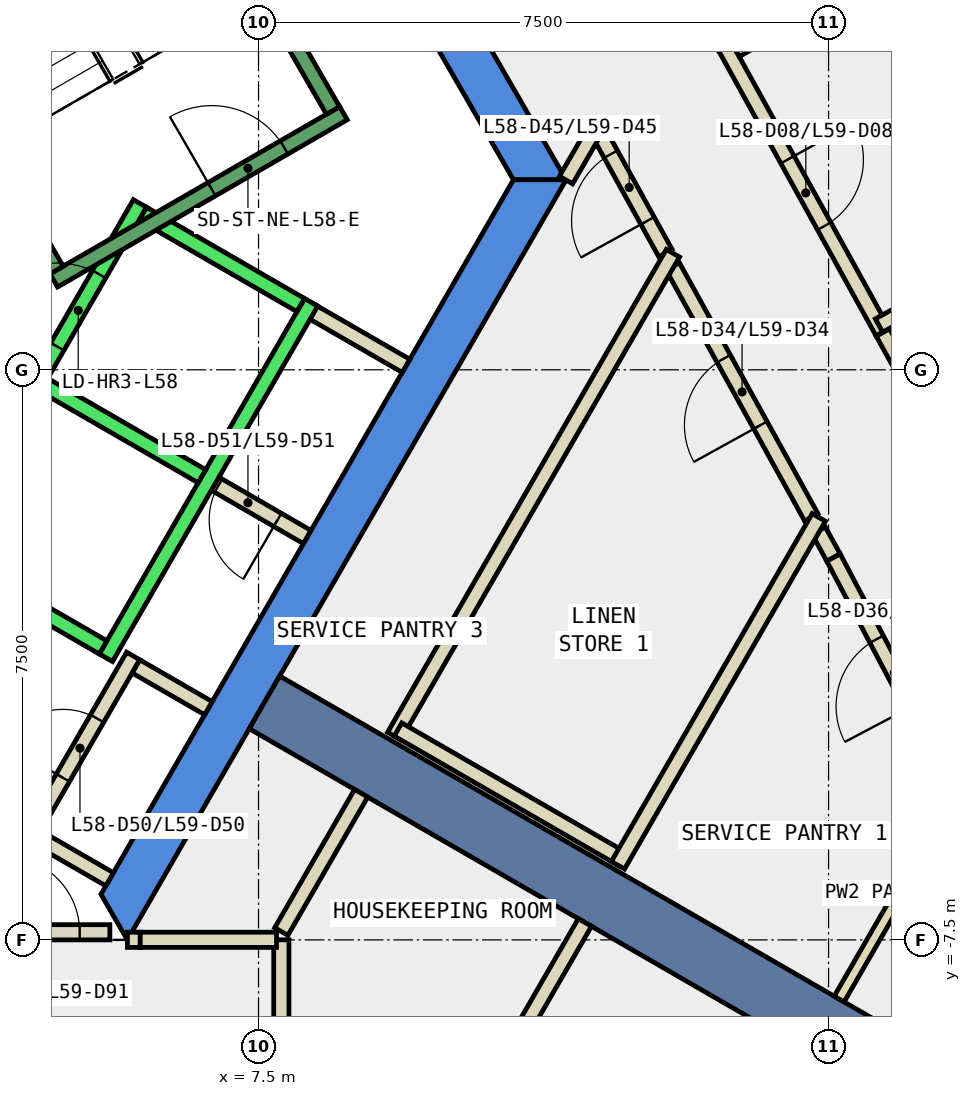
"""IFC4 building model, lengths in metres.
Left out: names, types, materials, properties, quantities, classifications, styles, units other than length and angle.
Written with IfcOpenShell. Run it as: python <this file> out.ifc"""

import sys

from ifc_helpers import new_model, si_unit, direction, frame, frame_2d, origin, place, context, subcontext, project, spatial, polyline, rectangle, outline, extrude, element, fill, save


model = new_model("IFC4")
c1 = context("Model", 3, precision=1e-05, world=origin(), true_north=direction((0.0, 1.0)))
c2 = subcontext(c1, "Body", "Model", "MODEL_VIEW")
j1 = project(units=[si_unit("LENGTHUNIT", "METRE"), si_unit("PLANEANGLEUNIT", "RADIAN")], contexts=[c1])
p1 = place(None, origin())
s1 = spatial("IfcSite", under=j1, at=p1, CompositionType="ELEMENT")
p2 = place(p1, origin())
s2 = spatial("IfcBuilding", under=s1, at=p2, CompositionType="ELEMENT")
p3 = place(p2, frame((0.0, 0.0, 255.8)))
s3 = spatial("IfcBuildingStorey", under=s2, at=p3, CompositionType="ELEMENT", Elevation=255.8)
p4 = place(p3, frame((0.0, 0.0, -0.34)))
e1 = element("IfcWall", 1, at=p4, inside=s3, PredefinedType="SHEAR", context=c2, shape_type="SweptSolid", body=[
    extrude(outline(polyline([(6.786, 10.747), (6.266, 10.447), (10.854, 2.5), (11.547, 2.5), (6.786, 10.747)])), origin(), (0.0, 0.0, 1.0), 3.6),
])
p5 = place(p3, frame((0.0, 0.0, -0.34)))
e2 = element("IfcWall", 2, at=p5, inside=s3, PredefinedType="SHEAR", context=c2, shape_type="SweptSolid", body=[
    extrude(outline(polyline([(5.774, -7.5), (11.547, 2.5), (10.854, 2.5), (5.427, -6.9), (5.774, -7.5)])), origin(), (0.0, 0.0, 1.0), 3.6),
])
p6 = place(p3, frame((7.578, -4.375, -0.34), z_axis=(0.0, 0.0, 1.0), x_axis=(0.866024315419, -0.5000018851, 0.0)))
e3 = element("IfcWall", 3, at=p6, inside=s3, PredefinedType="SHEAR", context=c2, shape_type="SweptSolid", body=[
    extrude(rectangle(XDim=9.0, YDim=0.8, at=frame_2d((4.5, 0.0))), origin(), (0.0, 0.0, 1.0), 3.6),
])
p7 = place(p3, frame((12.854, 1.535, 0.0), z_axis=(0.0, 0.0, 1.0), x_axis=(-0.483730980407, 0.875216738068, 0.0)))
e4 = element("IfcWall", 4, at=p7, inside=s3, PredefinedType="PARTITIONING", context=c2, shape_type="SweptSolid", body=[
    extrude(rectangle(XDim=1.974, YDim=0.2, at=frame_2d((0.987, 0.0))), origin(), (0.0, 0.0, 1.0), 3.26),
])
p8 = place(p7, frame((0.487, 0.0, 0.0)))
e5 = element("IfcOpeningElement", 5, at=p8, cuts=e4, PredefinedType="OPENING", context=c2, shape_type="SweptSolid", body=[
    extrude(rectangle(XDim=1.0, YDim=2.1, at=frame_2d((0.5, 1.05))), frame((0.0, 0.11, 0.0), z_axis=(0.0, -1.0, 0.0), x_axis=(1.0, 0.0, 0.0)), (0.0, 0.0, 1.0), 0.22),
])
p9 = place(p3, frame((11.893, 3.097, 0.0), z_axis=(0.0, 0.0, 1.0), x_axis=(-0.500911294014, -0.865498628265, 0.0)))
e6 = element("IfcWall", 6, at=p9, inside=s3, PredefinedType="PARTITIONING", context=c2, shape_type="SweptSolid", body=[
    extrude(rectangle(XDim=0.693, YDim=0.2, at=frame_2d((0.347, 0.0))), origin(), (0.0, 0.0, 1.0), 3.26),
])
p10 = place(p3, frame((14.773, -1.941, 0.0), z_axis=(0.0, 0.0, 1.0), x_axis=(-0.483431586589, 0.875382145744, 0.0)))
e7 = element("IfcWall", 7, at=p10, inside=s3, PredefinedType="PARTITIONING", context=c2, shape_type="SweptSolid", body=[
    extrude(rectangle(XDim=3.771, YDim=0.2, at=frame_2d((1.885, 0.0))), origin(), (0.0, 0.0, 1.0), 3.26),
])
p11 = place(p10, frame((1.385, 0.0, 0.0)))
e8 = element("IfcOpeningElement", 8, at=p11, cuts=e7, PredefinedType="OPENING", context=c2, shape_type="SweptSolid", body=[
    extrude(rectangle(XDim=1.0, YDim=2.1, at=frame_2d((0.5, 1.05))), frame((0.0, 0.11, 0.0), z_axis=(0.0, -1.0, 0.0), x_axis=(1.0, 0.0, 0.0)), (0.0, 0.0, 1.0), 0.22),
])
p12 = place(p3, frame((16.667, -5.505, 0.0), z_axis=(0.0, 0.0, 1.0), x_axis=(-0.466812680399, 0.884356218624, 0.0)))
e9 = element("IfcWall", 9, at=p12, inside=s3, PredefinedType="PARTITIONING", context=c2, shape_type="SweptSolid", body=[
    extrude(rectangle(XDim=3.434, YDim=0.2, at=frame_2d((1.717, 0.0))), origin(), (0.0, 0.0, 1.0), 3.26),
])
p13 = place(p12, frame((1.217, 0.0, 0.0)))
e10 = element("IfcOpeningElement", 10, at=p13, cuts=e9, PredefinedType="OPENING", context=c2, shape_type="SweptSolid", body=[
    extrude(rectangle(XDim=1.0, YDim=2.1, at=frame_2d((0.5, 1.05))), frame((0.0, 0.11, 0.0), z_axis=(0.0, -1.0, 0.0), x_axis=(1.0, 0.0, 0.0)), (0.0, 0.0, 1.0), 0.22),
])
p14 = place(p3, frame((15.064, -2.468, 0.0), z_axis=(0.0, 0.0, 1.0), x_axis=(-0.482338449744, 0.875984942735, 0.0)))
e11 = element("IfcWall", 11, at=p14, inside=s3, PredefinedType="PARTITIONING", context=c2, shape_type="SweptSolid", body=[
    extrude(rectangle(XDim=0.402, YDim=0.2, at=frame_2d((0.201, 0.0))), origin(), (0.0, 0.0, 1.0), 3.26),
])
p15 = place(p3, frame((13.641, 4.246, 0.0), z_axis=(0.0, 0.0, 1.0), x_axis=(0.483405752983, -0.875396411909, 0.0)))
e12 = element("IfcWall", 12, at=p15, inside=s3, PredefinedType="PARTITIONING", context=c2, shape_type="SweptSolid", body=[
    extrude(rectangle(XDim=4.284, YDim=0.2, at=frame_2d((2.142, 0.0))), origin(), (0.0, 0.0, 1.0), 3.26),
])
p16 = place(p15, frame((1.692, 0.0, 0.0)))
e13 = element("IfcOpeningElement", 13, at=p16, cuts=e12, PredefinedType="OPENING", context=c2, shape_type="SweptSolid", body=[
    extrude(rectangle(XDim=1.0, YDim=2.1, at=frame_2d((0.5, 1.05))), frame((0.0, 0.11, 0.0), z_axis=(0.0, -1.0, 0.0), x_axis=(1.0, 0.0, 0.0)), (0.0, 0.0, 1.0), 0.22),
])
p17 = place(p3, frame((15.715, 0.491, 0.0), z_axis=(0.0, 0.0, 1.0), x_axis=(0.483421428323, -0.875387755591, 0.0)))
e14 = element("IfcWall", 14, at=p17, inside=s3, PredefinedType="PARTITIONING", context=c2, shape_type="SweptSolid", body=[
    extrude(rectangle(XDim=2.194, YDim=0.2, at=frame_2d((1.097, 0.0))), origin(), (0.0, 0.0, 1.0), 3.26),
])
p18 = place(p3, frame((5.541, -6.703, 0.0), z_axis=(0.0, 0.0, 1.0), x_axis=(-0.86621513555, 0.499671230855, 0.0)))
e15 = element("IfcWall", 15, at=p18, inside=s3, PredefinedType="PARTITIONING", context=c2, shape_type="SweptSolid", body=[
    extrude(rectangle(XDim=1.1, YDim=0.2, at=frame_2d((0.55, 0.0))), origin(), (0.0, 0.0, 1.0), 3.26),
])
p19 = place(p3, frame((4.451, -6.19, 0.0), z_axis=(0.0, 0.0, 1.0), x_axis=(0.500011755427, 0.866018616679, 0.0)))
e16 = element("IfcWall", 16, at=p19, inside=s3, PredefinedType="PARTITIONING", context=c2, shape_type="SweptSolid", body=[
    extrude(rectangle(XDim=2.8, YDim=0.2, at=frame_2d((1.4, 0.0))), origin(), (0.0, 0.0, 1.0), 3.26),
])
p20 = place(p19, frame((0.95, 0.0, 0.0)))
e17 = element("IfcOpeningElement", 17, at=p20, cuts=e16, PredefinedType="OPENING", context=c2, shape_type="SweptSolid", body=[
    extrude(rectangle(XDim=0.9, YDim=2.1, at=frame_2d((0.45, 1.05))), frame((0.0, 0.11, 0.0), z_axis=(0.0, -1.0, 0.0), x_axis=(1.0, 0.0, 0.0)), (0.0, 0.0, 1.0), 0.22),
])
p21 = place(p3, frame((5.888, -3.902, 0.0), z_axis=(0.0, 0.0, 1.0), x_axis=(0.86621513555, -0.499671230855, 0.0)))
e18 = element("IfcWall", 18, at=p21, inside=s3, PredefinedType="PARTITIONING", context=c2, shape_type="SweptSolid", body=[
    extrude(rectangle(XDim=1.1, YDim=0.2, at=frame_2d((0.55, 0.0))), origin(), (0.0, 0.0, 1.0), 3.26),
])
p22 = place(p3, frame((8.14, -2.2, 0.0), z_axis=(0.0, 0.0, 1.0), x_axis=(-0.865545166185, 0.500830874941, 0.0)))
e19 = element("IfcWall", 19, at=p22, inside=s3, PredefinedType="PARTITIONING", context=c2, shape_type="SweptSolid", body=[
    extrude(rectangle(XDim=1.5, YDim=0.2, at=frame_2d((0.75, 0.0))), origin(), (0.0, 0.0, 1.0), 3.26),
])
p23 = place(p22, frame((0.45, 0.0, 0.0)))
e20 = element("IfcOpeningElement", 20, at=p23, cuts=e19, PredefinedType="OPENING", context=c2, shape_type="SweptSolid", body=[
    extrude(rectangle(XDim=0.9, YDim=2.1, at=frame_2d((0.45, 1.05))), frame((0.0, 0.11, 0.0), z_axis=(0.0, -1.0, 0.0), x_axis=(1.0, 0.0, 0.0)), (0.0, 0.0, 1.0), 0.22),
])
p24 = place(p3, frame((8.141, 0.801, 0.0), z_axis=(0.0, 0.0, 1.0), x_axis=(0.866434738017, -0.499290341141, 0.0)))
e21 = element("IfcWall", 21, at=p24, inside=s3, PredefinedType="PARTITIONING", context=c2, shape_type="SweptSolid", body=[
    extrude(rectangle(XDim=1.5, YDim=0.2, at=frame_2d((0.75, 0.0))), origin(), (0.0, 0.0, 1.0), 3.26),
])
p25 = place(p3, frame((5.775, -7.499, 0.0), z_axis=(0.0, 0.0, 1.0), x_axis=(1.0, 0.0, 0.0)))
e22 = element("IfcWall", 22, at=p25, inside=s3, PredefinedType="PARTITIONING", context=c2, shape_type="SweptSolid", body=[
    extrude(rectangle(XDim=0.169, YDim=0.2, at=frame_2d((0.084, 0.0))), origin(), (0.0, 0.0, 1.0), 2.4),
])
p26 = place(p3, frame((7.8, -7.39, 0.0), z_axis=(0.0, 0.0, 1.0), x_axis=(0.499977374825, 0.866038466041, 0.0)))
e23 = element("IfcWall", 23, at=p26, inside=s3, PredefinedType="PARTITIONING", context=c2, shape_type="SweptSolid", body=[
    extrude(rectangle(XDim=2.1, YDim=0.2, at=frame_2d((1.05, 0.0))), origin(), (0.0, 0.0, 1.0), 3.26),
])
p27 = place(p3, frame((9.285, -4.818, 0.0), z_axis=(0.0, 0.0, 1.0), x_axis=(0.499962569651, 0.866047013128, 0.0)))
e24 = element("IfcWall", 24, at=p27, inside=s3, PredefinedType="PARTITIONING", context=c2, shape_type="SweptSolid", body=[
    extrude(rectangle(XDim=7.334, YDim=0.2, at=frame_2d((3.667, 0.0))), origin(), (0.0, 0.0, 1.0), 3.26),
])
p28 = place(p3, frame((7.8, -7.499, 0.0), z_axis=(0.0, 0.0, 1.0), x_axis=(0.0, -1.0, 0.0)))
e25 = element("IfcWall", 25, at=p28, inside=s3, PredefinedType="PARTITIONING", context=c2, shape_type="SweptSolid", body=[
    extrude(rectangle(XDim=4.685, YDim=0.2, at=frame_2d((2.343, 0.0))), origin(), (0.0, 0.0, 1.0), 3.26),
])
p29 = place(p28, frame((1.842, 0.0, 0.0)))
e26 = element("IfcOpeningElement", 26, at=p29, cuts=e25, PredefinedType="OPENING", context=c2, shape_type="SweptSolid", body=[
    extrude(rectangle(XDim=1.0, YDim=2.1, at=frame_2d((0.5, 1.05))), frame((0.0, 0.11, 0.0), z_axis=(0.0, -1.0, 0.0), x_axis=(1.0, 0.0, 0.0)), (0.0, 0.0, 1.0), 0.22),
])
p30 = place(p3, frame((9.335, -4.732, 0.0), z_axis=(0.0, 0.0, 1.0), x_axis=(0.866002606077, -0.500039484709, 0.0)))
e27 = element("IfcWall", 27, at=p30, inside=s3, PredefinedType="PARTITIONING", context=c2, shape_type="SweptSolid", body=[
    extrude(rectangle(XDim=3.4, YDim=0.2, at=frame_2d((1.7, 0.0))), origin(), (0.0, 0.0, 1.0), 3.26),
])
p31 = place(p3, frame((11.794, -7.271, 0.0), z_axis=(0.0, 0.0, 1.0), x_axis=(-0.499918457185, -0.866072477433, 0.0)))
e28 = element("IfcWall", 28, at=p31, inside=s3, PredefinedType="PARTITIONING", context=c2, shape_type="SweptSolid", body=[
    extrude(rectangle(XDim=5.607, YDim=0.2, at=frame_2d((2.803, 0.0))), origin(), (0.0, 0.0, 1.0), 3.26),
])
p32 = place(p3, frame((14.871, -1.942, 0.0), z_axis=(0.0, 0.0, 1.0), x_axis=(-0.50000507839, -0.866022471755, 0.0)))
e29 = element("IfcWall", 29, at=p32, inside=s3, PredefinedType="PARTITIONING", context=c2, shape_type="SweptSolid", body=[
    extrude(rectangle(XDim=5.284, YDim=0.2, at=frame_2d((2.642, 0.0))), origin(), (0.0, 0.0, 1.0), 3.26),
])
p33 = place(p3, frame((16.752, -5.485, 0.0), z_axis=(0.0, 0.0, 1.0), x_axis=(-0.499988848364, -0.866031842089, 0.0)))
e30 = element("IfcWall", 30, at=p33, inside=s3, PredefinedType="PARTITIONING", context=c2, shape_type="SweptSolid", body=[
    extrude(rectangle(XDim=3.226, YDim=0.15, at=frame_2d((1.613, 0.0))), origin(), (0.0, 0.0, 1.0), 3.26),
])
p34 = place(p3, frame((17.677, 1.695, 0.0), z_axis=(0.0, 0.0, 1.0), x_axis=(-0.875306576455, -0.483568399727, 0.0)))
e31 = element("IfcWall", 31, at=p34, inside=s3, PredefinedType="PARTITIONING", context=c2, shape_type="SweptSolid", body=[
    extrude(rectangle(XDim=2.3, YDim=0.2, at=frame_2d((1.15, 0.0))), origin(), (0.0, 0.0, 1.0), 3.26),
])
p35 = place(p3, frame((13.776, 4.208, 0.0), z_axis=(0.0, 0.0, 1.0), x_axis=(0.870669592898, 0.491868336044, 0.0)))
e32 = element("IfcWall", 32, at=p35, inside=s3, PredefinedType="PARTITIONING", context=c2, shape_type="SweptSolid", body=[
    extrude(rectangle(XDim=2.3, YDim=0.2, at=frame_2d((1.15, 0.0))), origin(), (0.0, 0.0, 1.0), 3.26),
])
p36 = place(p3, frame((3.75, -7.4, 0.0), z_axis=(0.0, 0.0, 1.0), x_axis=(1.0, 0.0, 0.0)))
e33 = element("IfcWall", 33, at=p36, inside=s3, PredefinedType="PARTITIONING", context=c2, shape_type="SweptSolid", body=[
    extrude(rectangle(XDim=1.794, YDim=0.2, at=frame_2d((0.897, 0.0))), origin(), (0.0, 0.0, 1.0), 2.4),
])
p37 = place(p36, frame((0.397, 0.0, 0.0)))
e34 = element("IfcOpeningElement", 34, at=p37, cuts=e33, PredefinedType="OPENING", context=c2, shape_type="SweptSolid", body=[
    extrude(rectangle(XDim=1.0, YDim=2.1, at=frame_2d((0.5, 1.05))), frame((0.0, 0.11, 0.0), z_axis=(0.0, -1.0, 0.0), x_axis=(1.0, 0.0, 0.0)), (0.0, 0.0, 1.0), 0.22),
])
p38 = place(p3, frame((5.944, -7.499, 0.0), z_axis=(0.0, 0.0, 1.0), x_axis=(1.0, 0.0, 0.0)))
e35 = element("IfcWall", 35, at=p38, inside=s3, PredefinedType="PARTITIONING", context=c2, shape_type="SweptSolid", body=[
    extrude(rectangle(XDim=1.793, YDim=0.2, at=frame_2d((0.896, 0.0))), origin(), (0.0, 0.0, 1.0), 3.26),
])
p39 = place(p3, frame((3.24, -2.488, 0.0), z_axis=(0.0, 0.0, 1.0), x_axis=(0.500034260056, 0.866005622828, 0.0)))
e36 = element("IfcWall", 36, at=p39, inside=s3, PredefinedType="STANDARD", context=c2, shape_type="SweptSolid", body=[
    extrude(rectangle(XDim=5.399, YDim=0.2, at=frame_2d((2.7, 0.0))), origin(), (0.0, 0.0, 1.0), 3.26),
])
p40 = place(p39, frame((3.225, 0.0, 0.0)))
e37 = element("IfcOpeningElement", 37, at=p40, cuts=e36, PredefinedType="OPENING", context=c2, shape_type="SweptSolid", body=[
    extrude(rectangle(XDim=1.1, YDim=2.1, at=frame_2d((0.55, 1.05))), frame((0.0, 0.11, 0.0), z_axis=(0.0, -1.0, 0.0), x_axis=(1.0, 0.0, 0.0)), (0.0, 0.0, 1.0), 0.22),
])
p41 = place(p39, frame((1.225, 0.0, 0.0)))
e38 = element("IfcOpeningElement", 38, at=p41, cuts=e36, PredefinedType="OPENING", context=c2, shape_type="SweptSolid", body=[
    extrude(rectangle(XDim=1.1, YDim=2.1, at=frame_2d((0.55, 1.05))), frame((0.0, 0.11, 0.0), z_axis=(0.0, -1.0, 0.0), x_axis=(1.0, 0.0, 0.0)), (0.0, 0.0, 1.0), 0.22),
])
p42 = place(p3, frame((5.492, -3.788, 0.0), z_axis=(0.0, 0.0, 1.0), x_axis=(0.500034260056, 0.866005622828, 0.0)))
e39 = element("IfcWall", 39, at=p42, inside=s3, PredefinedType="STANDARD", context=c2, shape_type="SweptSolid", body=[
    extrude(rectangle(XDim=5.399, YDim=0.2, at=frame_2d((2.7, 0.0))), origin(), (0.0, 0.0, 1.0), 3.26),
])
p43 = place(p3, frame((3.377, -2.452, 0.0), z_axis=(0.0, 0.0, 1.0), x_axis=(0.865955154139, -0.50012165622, 0.0)))
e40 = element("IfcWall", 40, at=p43, inside=s3, PredefinedType="STANDARD", context=c2, shape_type="SweptSolid", body=[
    extrude(rectangle(XDim=2.4, YDim=0.2, at=frame_2d((1.2, 0.0))), origin(), (0.0, 0.0, 1.0), 3.26),
])
for number, where, z_axis, x_axis in (
    (41, (4.677, -0.2, 0.0), (0.0, 0.0, 1.0), (0.866, -0.5, 0.0)),
    (42, (5.977, 2.052, 0.0), (0.0, 0.0, 1.0), (0.866, -0.5, 0.0)),
):
    element("IfcWall", number, at=place(p3, frame(where, z_axis=z_axis, x_axis=x_axis)), inside=s3, PredefinedType="STANDARD", context=c2, shape_type="SweptSolid", body=[
        extrude(rectangle(XDim=2.399, YDim=0.2, at=frame_2d((1.2, 0.0))), origin(), (0.0, 0.0, 1.0), 3.26),
    ])
p44 = place(p3, frame((4.806, 1.176, 0.0), z_axis=(0.0, 0.0, 1.0), x_axis=(0.866059941101, 0.499940174841, 0.0)))
e43 = element("IfcWall", 43, at=p44, inside=s3, PredefinedType="STANDARD", context=c2, shape_type="SweptSolid", body=[
    extrude(rectangle(XDim=4.4, YDim=0.2, at=frame_2d((2.2, 0.0))), origin(), (0.0, 0.0, 1.0), 3.26),
])
p45 = place(p44, frame((2.4, 0.0, 0.0)))
e44 = element("IfcOpeningElement", 44, at=p45, cuts=e43, PredefinedType="OPENING", context=c2, shape_type="SweptSolid", body=[
    extrude(rectangle(XDim=1.1, YDim=2.2, at=frame_2d((0.55, 1.1))), frame((0.0, 0.11, 0.0), z_axis=(0.0, -1.0, 0.0), x_axis=(1.0, 0.0, 0.0)), (0.0, 0.0, 1.0), 0.22),
])
p46 = place(p3, frame((4.843, 1.312, 0.0), z_axis=(0.0, 0.0, 1.0), x_axis=(-0.499963383562, 0.866046543262, 0.0)))
e45 = element("IfcWall", 45, at=p46, inside=s3, PredefinedType="STANDARD", context=c2, shape_type="SweptSolid", body=[
    extrude(rectangle(XDim=6.9, YDim=0.2, at=frame_2d((3.45, 0.0))), origin(), (0.0, 0.0, 1.0), 3.26),
])
p47 = place(p46, frame((0.45, 0.0, 0.0)))
e46 = element("IfcOpeningElement", 46, at=p47, cuts=e45, PredefinedType="OPENING", context=c2, shape_type="SweptSolid", body=[
    extrude(rectangle(XDim=1.1, YDim=2.2, at=frame_2d((0.55, 1.1))), frame((0.0, 0.11, 0.0), z_axis=(0.0, -1.0, 0.0), x_axis=(1.0, 0.0, 0.0)), (0.0, 0.0, 1.0), 0.22),
])
p48 = place(p3, frame((8.48, 3.412, 0.0), z_axis=(0.0, 0.0, 1.0), x_axis=(-0.499978703459, 0.866037698999, 0.0)))
e47 = element("IfcWall", 47, at=p48, inside=s3, PredefinedType="STANDARD", context=c2, shape_type="SweptSolid", body=[
    extrude(rectangle(XDim=6.9, YDim=0.2, at=frame_2d((3.45, 0.0))), origin(), (0.0, 0.0, 1.0), 3.26),
])
p49 = place(p16, origin())
e48 = element("IfcDoor", 48, at=p49, inside=s3, OperationType="SINGLE_SWING_RIGHT", PredefinedType="DOOR", context=c2, shape_type="SweptSolid", body=[
    extrude(rectangle(XDim=1.0, YDim=2.1, at=frame_2d((0.5, 1.05))), frame((0.0, 0.025, 0.0), z_axis=(0.0, -1.0, 0.0), x_axis=(1.0, 0.0, 0.0)), (0.0, 0.0, 1.0), 0.05),
])
fill(e13, e48)
p50 = place(p11, origin())
e49 = element("IfcDoor", 49, at=p50, inside=s3, OperationType="SINGLE_SWING_LEFT", PredefinedType="DOOR", context=c2, shape_type="SweptSolid", body=[
    extrude(rectangle(XDim=1.0, YDim=2.1, at=frame_2d((0.5, 1.05))), frame((0.0, 0.025, 0.0), z_axis=(0.0, -1.0, 0.0), x_axis=(1.0, 0.0, 0.0)), (0.0, 0.0, 1.0), 0.05),
])
fill(e8, e49)
p51 = place(p13, origin())
e50 = element("IfcDoor", 50, at=p51, inside=s3, OperationType="SINGLE_SWING_RIGHT", PredefinedType="DOOR", context=c2, shape_type="SweptSolid", body=[
    extrude(rectangle(XDim=1.0, YDim=2.1, at=frame_2d((0.5, 1.05))), frame((0.0, 0.025, 0.0), z_axis=(0.0, -1.0, 0.0), x_axis=(1.0, 0.0, 0.0)), (0.0, 0.0, 1.0), 0.05),
])
fill(e10, e50)
p52 = place(p8, origin())
e51 = element("IfcDoor", 51, at=p52, inside=s3, OperationType="SINGLE_SWING_LEFT", PredefinedType="DOOR", context=c2, shape_type="SweptSolid", body=[
    extrude(rectangle(XDim=1.0, YDim=2.1, at=frame_2d((0.5, 1.05))), frame((0.0, 0.025, 0.0), z_axis=(0.0, -1.0, 0.0), x_axis=(1.0, 0.0, 0.0)), (0.0, 0.0, 1.0), 0.05),
])
fill(e5, e51)
p53 = place(p20, origin())
e52 = element("IfcDoor", 52, at=p53, inside=s3, OperationType="SINGLE_SWING_LEFT", PredefinedType="DOOR", context=c2, shape_type="SweptSolid", body=[
    extrude(rectangle(XDim=0.9, YDim=2.1, at=frame_2d((0.45, 1.05))), frame((0.0, 0.025, 0.0), z_axis=(0.0, -1.0, 0.0), x_axis=(1.0, 0.0, 0.0)), (0.0, 0.0, 1.0), 0.05),
])
fill(e17, e52)
p54 = place(p23, origin())
e53 = element("IfcDoor", 53, at=p54, inside=s3, OperationType="SINGLE_SWING_LEFT", PredefinedType="DOOR", context=c2, shape_type="SweptSolid", body=[
    extrude(rectangle(XDim=0.9, YDim=2.1, at=frame_2d((0.45, 1.05))), frame((0.0, 0.025, 0.0), z_axis=(0.0, -1.0, 0.0), x_axis=(1.0, 0.0, 0.0)), (0.0, 0.0, 1.0), 0.05),
])
fill(e20, e53)
p55 = place(p37, origin())
e54 = element("IfcDoor", 54, at=p55, inside=s3, OperationType="SINGLE_SWING_LEFT", PredefinedType="DOOR", context=c2, shape_type="SweptSolid", body=[
    extrude(rectangle(XDim=1.0, YDim=2.1, at=frame_2d((0.5, 1.05))), frame((0.0, 0.025, 0.0), z_axis=(0.0, -1.0, 0.0), x_axis=(1.0, 0.0, 0.0)), (0.0, 0.0, 1.0), 0.05),
])
fill(e34, e54)
p56 = place(p40, origin())
e55 = element("IfcDoor", 55, at=p56, inside=s3, OperationType="SLIDING_TO_LEFT", PredefinedType="DOOR", context=c2, shape_type="SweptSolid", body=[
    extrude(rectangle(XDim=1.1, YDim=2.1, at=frame_2d((0.55, 1.05))), frame((0.0, 0.025, 0.0), z_axis=(0.0, -1.0, 0.0), x_axis=(1.0, 0.0, 0.0)), (0.0, 0.0, 1.0), 0.05),
])
fill(e37, e55)
p57 = place(p45, origin())
e56 = element("IfcDoor", 56, at=p57, inside=s3, OperationType="SINGLE_SWING_LEFT", PredefinedType="DOOR", context=c2, shape_type="SweptSolid", body=[
    extrude(rectangle(XDim=1.1, YDim=2.2, at=frame_2d((0.55, 1.1))), frame((0.0, 0.025, 0.0), z_axis=(0.0, -1.0, 0.0), x_axis=(1.0, 0.0, 0.0)), (0.0, 0.0, 1.0), 0.05),
])
fill(e44, e56)
save(model, sys.argv[1])
